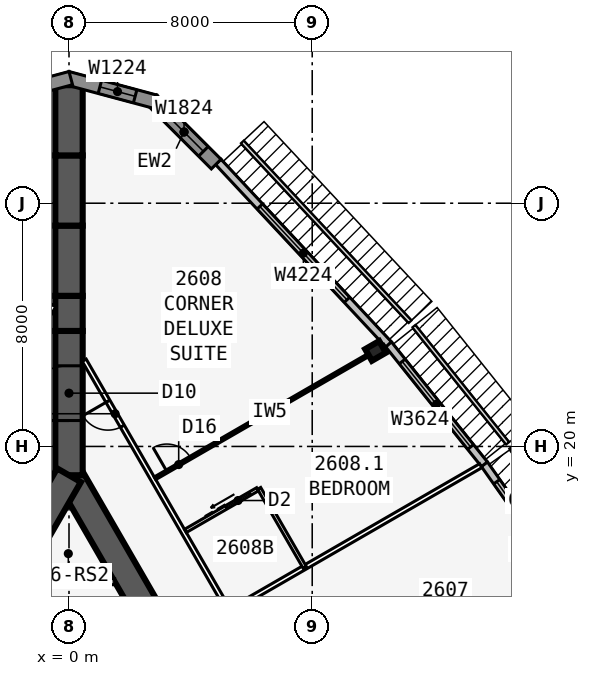
"""IFC4 building model, lengths in metres.
Left out: names, types, materials, properties, quantities, classifications, styles, units other than length and angle.
Written with IfcOpenShell. Run it as: python <this file> out.ifc"""

import sys

from ifc_helpers import new_model, si_unit, direction, frame, frame_2d, origin, origin_2d, place, context, subcontext, project, spatial, polyline, rectangle, i_section, outline, extrude, element, fill, save


model = new_model("IFC4")
c1 = context("Model", 3, precision=1e-05, world=origin(), true_north=direction((0.0, 1.0)))
c2 = subcontext(c1, "Body", "Model", "MODEL_VIEW")
j1 = project(units=[si_unit("LENGTHUNIT", "METRE"), si_unit("PLANEANGLEUNIT", "RADIAN")], contexts=[c1])
p1 = place(None, origin())
s1 = spatial("IfcSite", under=j1, at=p1, CompositionType="ELEMENT")
p2 = place(p1, origin())
s2 = spatial("IfcBuilding", under=s1, at=p2, CompositionType="ELEMENT")
p3 = place(p2, frame((0.0, 0.0, 99.9)))
s3 = spatial("IfcBuildingStorey", under=s2, at=p3, CompositionType="ELEMENT", Elevation=99.9)
p4 = place(p3, frame((16.5, -9.526, 0.0), z_axis=(0.0, 0.0, 1.0), x_axis=(-0.499999749417, 0.866025548458, 0.0)))
e1 = element("IfcWall", 1, at=p4, inside=s3, PredefinedType="SHEAR", context=c2, shape_type="SweptSolid", body=[
    extrude(rectangle(XDim=33.0, YDim=0.9, at=frame_2d((16.5, 0.0))), origin(), (0.0, 0.0, 1.0), 3.4),
])
p5 = place(p4, frame((14.15, 0.0, 0.0)))
e2 = element("IfcOpeningElement", 2, at=p5, cuts=e1, PredefinedType="OPENING", context=c2, shape_type="SweptSolid", body=[
    extrude(rectangle(XDim=1.8, YDim=2.13, at=frame_2d((0.9, 1.065))), frame((0.0, 0.46, 0.0), z_axis=(0.0, -1.0, 0.0), x_axis=(1.0, 0.0, 0.0)), (0.0, 0.0, 1.0), 0.92),
])
p6 = place(p4, frame((12.6, 0.0, 0.0)))
e3 = element("IfcOpeningElement", 3, at=p6, cuts=e1, PredefinedType="OPENING", context=c2, shape_type="SweptSolid", body=[
    extrude(rectangle(XDim=1.0, YDim=2.13, at=frame_2d((0.5, 1.065))), frame((0.0, 0.46, 0.0), z_axis=(0.0, -1.0, 0.0), x_axis=(1.0, 0.0, 0.0)), (0.0, 0.0, 1.0), 0.92),
])
p7 = place(p3, frame((0.0, 19.052, 0.0), z_axis=(0.0, 0.0, 1.0), x_axis=(-0.499999749417, -0.866025548458, 0.0)))
e4 = element("IfcWall", 4, at=p7, inside=s3, PredefinedType="SHEAR", context=c2, shape_type="SweptSolid", body=[
    extrude(rectangle(XDim=33.0, YDim=0.9, at=frame_2d((16.5, 0.0))), origin(), (0.0, 0.0, 1.0), 3.4),
])
p8 = place(p7, frame((14.15, 0.0, 0.0)))
e5 = element("IfcOpeningElement", 5, at=p8, cuts=e4, PredefinedType="OPENING", context=c2, shape_type="SweptSolid", body=[
    extrude(rectangle(XDim=1.8, YDim=2.13, at=frame_2d((0.9, 1.065))), frame((0.0, 0.46, 0.0), z_axis=(0.0, -1.0, 0.0), x_axis=(1.0, 0.0, 0.0)), (0.0, 0.0, 1.0), 0.92),
])
p9 = place(p7, frame((12.6, 0.0, 0.0)))
e6 = element("IfcOpeningElement", 6, at=p9, cuts=e4, PredefinedType="OPENING", context=c2, shape_type="SweptSolid", body=[
    extrude(rectangle(XDim=1.0, YDim=2.13, at=frame_2d((0.5, 1.065))), frame((0.0, 0.46, 0.0), z_axis=(0.0, -1.0, 0.0), x_axis=(1.0, 0.0, 0.0)), (0.0, 0.0, 1.0), 0.92),
])
p10 = place(p3, frame((0.0, 19.052, 0.0), z_axis=(0.0, 0.0, 1.0), x_axis=(0.0, 1.0, 0.0)))
e7 = element("IfcWall", 7, at=p10, inside=s3, PredefinedType="SHEAR", context=c2, shape_type="SweptSolid", body=[
    extrude(rectangle(XDim=4.746, YDim=0.9, at=frame_2d((2.373, 0.0))), origin(), (0.0, 0.0, 1.0), 3.4),
])
p11 = place(p10, frame((1.8, 0.0, 0.0)))
e8 = element("IfcOpeningElement", 8, at=p11, cuts=e7, PredefinedType="OPENING", context=c2, shape_type="SweptSolid", body=[
    extrude(rectangle(XDim=1.8, YDim=2.13, at=frame_2d((0.9, 1.065))), frame((0.0, 0.46, 0.0), z_axis=(0.0, -1.0, 0.0), x_axis=(1.0, 0.0, 0.0)), (0.0, 0.0, 1.0), 0.92),
])
p12 = place(p3, frame((0.0, 23.799, 0.0), z_axis=(0.0, 0.0, 1.0), x_axis=(0.0, 1.0, 0.0)))
e9 = element("IfcWall", 9, at=p12, inside=s3, PredefinedType="SHEAR", context=c2, shape_type="SweptSolid", body=[
    extrude(rectangle(XDim=1.155, YDim=0.9, at=frame_2d((0.577, 0.0))), origin(), (0.0, 0.0, 1.0), 3.4),
])
p13 = place(p3, frame((0.0, 24.953, 0.0), z_axis=(0.0, 0.0, 1.0), x_axis=(0.0, 1.0, 0.0)))
e10 = element("IfcWall", 10, at=p13, inside=s3, PredefinedType="SHEAR", context=c2, shape_type="SweptSolid", body=[
    extrude(rectangle(XDim=2.309, YDim=0.9, at=frame_2d((1.155, 0.0))), origin(), (0.0, 0.0, 1.0), 3.4),
])
p14 = place(p3, frame((0.0, 27.263, 0.0), z_axis=(0.0, 0.0, 1.0), x_axis=(0.0, 1.0, 0.0)))
e11 = element("IfcWall", 11, at=p14, inside=s3, PredefinedType="SHEAR", context=c2, shape_type="SweptSolid", body=[
    extrude(rectangle(XDim=2.31, YDim=0.9, at=frame_2d((1.155, 0.0))), origin(), (0.0, 0.0, 1.0), 3.4),
])
p15 = place(p3, frame((0.0, 29.572, 0.0), z_axis=(0.0, 0.0, 1.0), x_axis=(0.0, 1.0, 0.0)))
e12 = element("IfcWall", 12, at=p15, inside=s3, PredefinedType="SHEAR", context=c2, shape_type="SweptSolid", body=[
    extrude(rectangle(XDim=2.309, YDim=0.9, at=frame_2d((1.155, 0.0))), origin(), (0.0, 0.0, 1.0), 3.4),
])
p16 = place(p3, frame((10.083, 23.142, 0.0), z_axis=(0.0, 0.0, 1.0), x_axis=(-0.5, 0.866025403784, 0.0)))
e13 = element("IfcColumn", 13, at=p16, inside=s3, PredefinedType="COLUMN", context=c2, shape_type="SweptSolid", body=[
    extrude(i_section(OverallWidth=0.442, OverallDepth=0.531, WebThickness=0.066, FlangeThickness=0.106, at=origin_2d()), origin(), (0.0, 0.0, 1.0), 3.4),
])
p17 = place(p3, frame((16.555, 15.318, 0.0), z_axis=(0.0, 0.0, 1.0), x_axis=(-0.5766431066, 0.81699616132, 0.0)))
e14 = element("IfcWall", 14, at=p17, inside=s3, PredefinedType="STANDARD", context=c2, shape_type="SweptSolid", body=[
    extrude(rectangle(XDim=5.021, YDim=0.25, at=frame_2d((2.51, 0.0))), origin(), (0.0, 0.0, 1.0), 3.15),
])
p18 = place(p17, frame((0.71, 0.0, 0.45)))
e15 = element("IfcOpeningElement", 15, at=p18, cuts=e14, PredefinedType="OPENING", context=c2, shape_type="SweptSolid", body=[
    extrude(rectangle(XDim=3.6, YDim=2.4, at=frame_2d((1.8, 1.2))), frame((0.0, 0.135, 0.0), z_axis=(0.0, -1.0, 0.0), x_axis=(1.0, 0.0, 0.0)), (0.0, 0.0, 1.0), 0.27),
])
p19 = place(p3, frame((13.664, 19.414, 0.0), z_axis=(0.0, 0.0, 1.0), x_axis=(-0.624594965756, 0.780948864364, 0.0)))
e16 = element("IfcWall", 16, at=p19, inside=s3, PredefinedType="STANDARD", context=c2, shape_type="SweptSolid", body=[
    extrude(rectangle(XDim=5.058, YDim=0.25, at=frame_2d((2.529, 0.0))), origin(), (0.0, 0.0, 1.0), 3.15),
])
p20 = place(p19, frame((0.729, 0.0, 0.45)))
e17 = element("IfcOpeningElement", 17, at=p20, cuts=e16, PredefinedType="OPENING", context=c2, shape_type="SweptSolid", body=[
    extrude(rectangle(XDim=3.6, YDim=2.4, at=frame_2d((1.8, 1.2))), frame((0.0, 0.135, 0.0), z_axis=(0.0, -1.0, 0.0), x_axis=(1.0, 0.0, 0.0)), (0.0, 0.0, 1.0), 0.27),
])
p21 = place(p3, frame((10.511, 23.357, 0.0), z_axis=(0.0, 0.0, 1.0), x_axis=(-0.682289646561, 0.731081964075, 0.0)))
e18 = element("IfcWall", 18, at=p21, inside=s3, PredefinedType="STANDARD", context=c2, shape_type="SweptSolid", body=[
    extrude(rectangle(XDim=8.211, YDim=0.25, at=frame_2d((4.105, 0.0))), origin(), (0.0, 0.0, 1.0), 3.15),
])
p22 = place(p21, frame((2.006, 0.0, 0.45)))
e19 = element("IfcOpeningElement", 19, at=p22, cuts=e18, PredefinedType="OPENING", context=c2, shape_type="SweptSolid", body=[
    extrude(rectangle(XDim=4.2, YDim=2.4, at=frame_2d((2.1, 1.2))), frame((0.0, 0.135, 0.0), z_axis=(0.0, -1.0, 0.0), x_axis=(1.0, 0.0, 0.0)), (0.0, 0.0, 1.0), 0.27),
])
p23 = place(p3, frame((4.841, 29.286, 0.0), z_axis=(0.0, 0.0, 1.0), x_axis=(-0.707106781187, 0.707106781187, 0.0)))
e20 = element("IfcWall", 20, at=p23, inside=s3, PredefinedType="SOLIDWALL", context=c2, shape_type="SweptSolid", body=[
    extrude(rectangle(XDim=2.988, YDim=0.45, at=frame_2d((1.494, 0.0))), origin(), (0.0, 0.0, 1.0), 3.15),
])
p24 = place(p23, frame((0.594, 0.0, 0.45)))
e21 = element("IfcOpeningElement", 21, at=p24, cuts=e20, PredefinedType="OPENING", context=c2, shape_type="SweptSolid", body=[
    extrude(rectangle(XDim=1.8, YDim=2.4, at=frame_2d((0.9, 1.2))), frame((0.0, 0.235, 0.0), z_axis=(0.0, -1.0, 0.0), x_axis=(1.0, 0.0, 0.0)), (0.0, 0.0, 1.0), 0.47),
])
p25 = place(p3, frame((2.829, 31.341, 0.0), z_axis=(0.0, 0.0, 1.0), x_axis=(-0.965930548995, 0.258801419081, 0.0)))
e22 = element("IfcWall", 22, at=p25, inside=s3, PredefinedType="SOLIDWALL", context=c2, shape_type="SweptSolid", body=[
    extrude(outline(polyline([(2.989, 0.225), (2.929, 0.225), (2.438, 0.093), (2.402, 0.225), (0.0, 0.225), (0.0, -0.225), (2.989, -0.225), (2.989, 0.225)])), origin(), (0.0, 0.0, 1.0), 3.15),
])
p26 = place(p25, frame((0.676, 0.0, 0.45)))
e23 = element("IfcOpeningElement", 23, at=p26, cuts=e22, PredefinedType="OPENING", context=c2, shape_type="SweptSolid", body=[
    extrude(rectangle(XDim=1.2, YDim=2.4, at=frame_2d((0.6, 1.2))), frame((0.0, 0.235, 0.0), z_axis=(0.0, -1.0, 0.0), x_axis=(1.0, 0.0, 0.0)), (0.0, 0.0, 1.0), 0.47),
])
p27 = place(p3, frame((0.058, 32.114, 0.0), z_axis=(0.0, 0.0, 1.0), x_axis=(-0.965930548995, -0.258801419081, 0.0)))
e24 = element("IfcWall", 24, at=p27, inside=s3, PredefinedType="SOLIDWALL", context=c2, shape_type="SweptSolid", body=[
    extrude(outline(polyline([(2.989, 0.225), (0.586, 0.225), (0.551, 0.093), (0.059, 0.225), (0.0, 0.225), (0.0, -0.225), (2.989, -0.225), (2.989, 0.225)])), origin(), (0.0, 0.0, 1.0), 3.15),
])
p28 = place(p27, frame((1.113, 0.0, 0.45)))
e25 = element("IfcOpeningElement", 25, at=p28, cuts=e24, PredefinedType="OPENING", context=c2, shape_type="SweptSolid", body=[
    extrude(rectangle(XDim=1.2, YDim=2.4, at=frame_2d((0.6, 1.2))), frame((0.0, 0.235, 0.0), z_axis=(0.0, -1.0, 0.0), x_axis=(1.0, 0.0, 0.0)), (0.0, 0.0, 1.0), 0.47),
])
p29 = place(p3, frame((20.027, -10.985, 0.0), z_axis=(0.0, 0.0, 1.0), x_axis=(-0.500001677587, 0.866024435227, 0.0)))
e26 = element("IfcWall", 26, at=p29, inside=s3, PredefinedType="PARTITIONING", context=c2, shape_type="SweptSolid", body=[
    extrude(rectangle(XDim=39.054, YDim=0.15, at=frame_2d((19.527, 0.0))), origin(), (0.0, 0.0, 1.0), 3.15),
])
p30 = place(p29, frame((1.558, 0.0, 0.0)))
e27 = element("IfcOpeningElement", 27, at=p30, cuts=e26, PredefinedType="OPENING", context=c2, shape_type="SweptSolid", body=[
    extrude(rectangle(XDim=0.95, YDim=2.13, at=frame_2d((0.475, 1.065))), frame((0.0, 0.085, 0.0), z_axis=(0.0, -1.0, 0.0), x_axis=(1.0, 0.0, 0.0)), (0.0, 0.0, 1.0), 0.17),
])
p31 = place(p29, frame((11.552, 0.0, 0.0)))
e28 = element("IfcOpeningElement", 28, at=p31, cuts=e26, PredefinedType="OPENING", context=c2, shape_type="SweptSolid", body=[
    extrude(rectangle(XDim=0.95, YDim=2.13, at=frame_2d((0.475, 1.065))), frame((0.0, 0.085, 0.0), z_axis=(0.0, -1.0, 0.0), x_axis=(1.0, 0.0, 0.0)), (0.0, 0.0, 1.0), 0.17),
])
p32 = place(p29, frame((22.752, 0.0, 0.0)))
e29 = element("IfcOpeningElement", 29, at=p32, cuts=e26, PredefinedType="OPENING", context=c2, shape_type="SweptSolid", body=[
    extrude(rectangle(XDim=0.95, YDim=2.13, at=frame_2d((0.475, 1.065))), frame((0.0, 0.085, 0.0), z_axis=(0.0, -1.0, 0.0), x_axis=(1.0, 0.0, 0.0)), (0.0, 0.0, 1.0), 0.17),
])
p33 = place(p29, frame((36.546, 0.0, 0.0)))
e30 = element("IfcOpeningElement", 30, at=p33, cuts=e26, PredefinedType="OPENING", context=c2, shape_type="SweptSolid", body=[
    extrude(rectangle(XDim=0.95, YDim=2.13, at=frame_2d((0.475, 1.065))), frame((0.0, 0.085, 0.0), z_axis=(0.0, -1.0, 0.0), x_axis=(1.0, 0.0, 0.0)), (0.0, 0.0, 1.0), 0.17),
])
p34 = place(p3, frame((5.329, 14.623, 0.0), z_axis=(0.0, 0.0, 1.0), x_axis=(0.866018409083, 0.500012114982, 0.0)))
e31 = element("IfcWall", 31, at=p34, inside=s3, PredefinedType="PARTITIONING", context=c2, shape_type="SweptSolid", body=[
    extrude(rectangle(XDim=9.485, YDim=0.15, at=frame_2d((4.742, 0.0))), origin(), (0.0, 0.0, 1.0), 2.109),
])
p35 = place(p3, frame((2.829, 18.954, 0.0), z_axis=(0.0, 0.0, 1.0), x_axis=(0.866020536561, 0.500008430184, 0.0)))
e32 = element("IfcWall", 32, at=p35, inside=s3, PredefinedType="PARTITIONING", context=c2, shape_type="SweptSolid", body=[
    extrude(rectangle(XDim=8.72, YDim=0.1, at=frame_2d((4.36, 0.0))), origin(), (0.0, 0.0, 1.0), 2.05),
])
p36 = place(p35, frame((0.45, 0.0, 0.0)))
e33 = element("IfcOpeningElement", 33, at=p36, cuts=e32, PredefinedType="OPENING", context=c2, shape_type="SweptSolid", body=[
    extrude(rectangle(XDim=0.9, YDim=2.032, at=frame_2d((0.45, 1.016))), frame((0.0, 0.06, 0.0), z_axis=(0.0, -1.0, 0.0), x_axis=(1.0, 0.0, 0.0)), (0.0, 0.0, 1.0), 0.12),
])
p37 = place(p3, frame((7.753, 16.023, 0.0), z_axis=(0.0, 0.0, 1.0), x_axis=(-0.499990139034, 0.866031096941, 0.0)))
e34 = element("IfcWall", 34, at=p37, inside=s3, PredefinedType="PLUMBINGWALL", context=c2, shape_type="SweptSolid", body=[
    extrude(rectangle(XDim=3.0, YDim=0.12, at=frame_2d((1.5, 0.0))), origin(), (0.0, 0.0, 1.0), 3.15),
])
p38 = place(p3, frame((3.829, 17.221, 0.0), z_axis=(0.0, 0.0, 1.0), x_axis=(0.865997131366, 0.500048966069, 0.0)))
e35 = element("IfcWall", 35, at=p38, inside=s3, PredefinedType="PLUMBINGWALL", context=c2, shape_type="SweptSolid", body=[
    extrude(rectangle(XDim=2.74, YDim=0.12, at=frame_2d((1.37, 0.0))), origin(), (0.0, 0.0, 1.0), 3.15),
])
p39 = place(p38, frame((1.55, 0.0, 0.0)))
e36 = element("IfcOpeningElement", 36, at=p39, cuts=e35, PredefinedType="OPENING", context=c2, shape_type="SweptSolid", body=[
    extrude(rectangle(XDim=0.9, YDim=2.13, at=frame_2d((0.45, 1.065))), frame((0.0, 0.07, 0.0), z_axis=(0.0, -1.0, 0.0), x_axis=(1.0, 0.0, 0.0)), (0.0, 0.0, 1.0), 0.14),
])
p40 = place(p3, frame((-0.5, 24.636, 0.0), z_axis=(0.0, 0.0, 1.0), x_axis=(-0.500001915564, -0.86602429783, 0.0)))
e37 = element("IfcWall", 37, at=p40, inside=s3, PredefinedType="PARTITIONING", context=c2, shape_type="SweptSolid", body=[
    extrude(rectangle(XDim=42.172, YDim=0.15, at=frame_2d((21.086, 0.0))), origin(), (0.0, 0.0, 1.0), 3.15),
])
p41 = place(p40, frame((1.911, 0.0, 0.0)))
e38 = element("IfcOpeningElement", 38, at=p41, cuts=e37, PredefinedType="OPENING", context=c2, shape_type="SweptSolid", body=[
    extrude(rectangle(XDim=0.95, YDim=2.13, at=frame_2d((0.475, 1.065))), frame((0.0, 0.085, 0.0), z_axis=(0.0, -1.0, 0.0), x_axis=(1.0, 0.0, 0.0)), (0.0, 0.0, 1.0), 0.17),
])
p42 = place(p40, frame((8.111, 0.0, 0.0)))
e39 = element("IfcOpeningElement", 39, at=p42, cuts=e37, PredefinedType="OPENING", context=c2, shape_type="SweptSolid", body=[
    extrude(rectangle(XDim=0.95, YDim=2.13, at=frame_2d((0.475, 1.065))), frame((0.0, 0.085, 0.0), z_axis=(0.0, -1.0, 0.0), x_axis=(1.0, 0.0, 0.0)), (0.0, 0.0, 1.0), 0.17),
])
p43 = place(p40, frame((18.111, 0.0, 0.0)))
e40 = element("IfcOpeningElement", 40, at=p43, cuts=e37, PredefinedType="OPENING", context=c2, shape_type="SweptSolid", body=[
    extrude(rectangle(XDim=0.95, YDim=2.13, at=frame_2d((0.475, 1.065))), frame((0.0, 0.085, 0.0), z_axis=(0.0, -1.0, 0.0), x_axis=(1.0, 0.0, 0.0)), (0.0, 0.0, 1.0), 0.17),
])
p44 = place(p40, frame((28.711, 0.0, 0.0)))
e41 = element("IfcOpeningElement", 41, at=p44, cuts=e37, PredefinedType="OPENING", context=c2, shape_type="SweptSolid", body=[
    extrude(rectangle(XDim=0.95, YDim=2.13, at=frame_2d((0.475, 1.065))), frame((0.0, 0.085, 0.0), z_axis=(0.0, -1.0, 0.0), x_axis=(1.0, 0.0, 0.0)), (0.0, 0.0, 1.0), 0.17),
])
p45 = place(p40, frame((33.711, 0.0, 0.0)))
e42 = element("IfcOpeningElement", 42, at=p45, cuts=e37, PredefinedType="OPENING", context=c2, shape_type="SweptSolid", body=[
    extrude(rectangle(XDim=0.95, YDim=2.13, at=frame_2d((0.475, 1.065))), frame((0.0, 0.085, 0.0), z_axis=(0.0, -1.0, 0.0), x_axis=(1.0, 0.0, 0.0)), (0.0, 0.0, 1.0), 0.17),
])
p46 = place(p40, frame((39.311, 0.0, 0.0)))
e43 = element("IfcOpeningElement", 43, at=p46, cuts=e37, PredefinedType="OPENING", context=c2, shape_type="SweptSolid", body=[
    extrude(rectangle(XDim=0.95, YDim=2.13, at=frame_2d((0.475, 1.065))), frame((0.0, 0.085, 0.0), z_axis=(0.0, -1.0, 0.0), x_axis=(1.0, 0.0, 0.0)), (0.0, 0.0, 1.0), 0.17),
])
p47 = place(p3, frame((-1.501, 15.552, 0.0), z_axis=(0.0, 0.0, 1.0), x_axis=(1.0, 0.0, 0.0)))
e44 = element("IfcWall", 44, at=p47, inside=s3, PredefinedType="SOLIDWALL", context=c2, shape_type="SweptSolid", body=[
    extrude(rectangle(XDim=3.002, YDim=0.2, at=frame_2d((1.501, 0.0))), origin(), (0.0, 0.0, 1.0), 3.15),
])
p48 = place(p18, origin())
e45 = element("IfcWindow", 45, at=p48, inside=s3, PartitioningType="SINGLE_PANEL", PredefinedType="WINDOW", context=c2, shape_type="SweptSolid", body=[
    extrude(rectangle(XDim=3.6, YDim=2.4, at=frame_2d((1.8, 1.2))), frame((0.0, 0.03, 0.0), z_axis=(0.0, -1.0, 0.0), x_axis=(1.0, 0.0, 0.0)), (0.0, 0.0, 1.0), 0.06),
])
fill(e15, e45)
p49 = place(p20, origin())
e46 = element("IfcWindow", 46, at=p49, inside=s3, PartitioningType="SINGLE_PANEL", PredefinedType="WINDOW", context=c2, shape_type="SweptSolid", body=[
    extrude(rectangle(XDim=3.6, YDim=2.4, at=frame_2d((1.8, 1.2))), frame((0.0, 0.03, 0.0), z_axis=(0.0, -1.0, 0.0), x_axis=(1.0, 0.0, 0.0)), (0.0, 0.0, 1.0), 0.06),
])
fill(e17, e46)
p50 = place(p22, origin())
e47 = element("IfcWindow", 47, at=p50, inside=s3, PartitioningType="SINGLE_PANEL", PredefinedType="WINDOW", context=c2, shape_type="SweptSolid", body=[
    extrude(rectangle(XDim=4.2, YDim=2.4, at=frame_2d((2.1, 1.2))), frame((0.0, 0.03, 0.0), z_axis=(0.0, -1.0, 0.0), x_axis=(1.0, 0.0, 0.0)), (0.0, 0.0, 1.0), 0.06),
])
fill(e19, e47)
p51 = place(p24, origin())
e48 = element("IfcWindow", 48, at=p51, inside=s3, PartitioningType="SINGLE_PANEL", PredefinedType="WINDOW", context=c2, shape_type="SweptSolid", body=[
    extrude(rectangle(XDim=1.8, YDim=2.4, at=frame_2d((0.9, 1.2))), frame((0.0, 0.03, 0.0), z_axis=(0.0, -1.0, 0.0), x_axis=(1.0, 0.0, 0.0)), (0.0, 0.0, 1.0), 0.06),
])
fill(e21, e48)
p52 = place(p26, origin())
e49 = element("IfcWindow", 49, at=p52, inside=s3, PartitioningType="SINGLE_PANEL", PredefinedType="WINDOW", context=c2, shape_type="SweptSolid", body=[
    extrude(rectangle(XDim=1.2, YDim=2.4, at=frame_2d((0.6, 1.2))), frame((0.0, 0.03, 0.0), z_axis=(0.0, -1.0, 0.0), x_axis=(1.0, 0.0, 0.0)), (0.0, 0.0, 1.0), 0.06),
])
fill(e23, e49)
p53 = place(p36, origin())
e50 = element("IfcDoor", 50, at=p53, inside=s3, OperationType="SINGLE_SWING_LEFT", PredefinedType="DOOR", context=c2, shape_type="SweptSolid", body=[
    extrude(rectangle(XDim=0.9, YDim=2.032, at=frame_2d((0.45, 1.016))), frame((0.0, 0.025, 0.0), z_axis=(0.0, -1.0, 0.0), x_axis=(1.0, 0.0, 0.0)), (0.0, 0.0, 1.0), 0.05),
])
fill(e33, e50)
p54 = place(p39, origin())
e51 = element("IfcDoor", 51, at=p54, inside=s3, OperationType="SLIDING_TO_LEFT", PredefinedType="DOOR", context=c2, shape_type="SweptSolid", body=[
    extrude(rectangle(XDim=0.9, YDim=2.13, at=frame_2d((0.45, 1.065))), frame((0.0, 0.025, 0.0), z_axis=(0.0, -1.0, 0.0), x_axis=(1.0, 0.0, 0.0)), (0.0, 0.0, 1.0), 0.05),
])
fill(e36, e51)
p55 = place(p33, origin())
e52 = element("IfcDoor", 52, at=p55, inside=s3, OperationType="SINGLE_SWING_RIGHT", PredefinedType="DOOR", context=c2, shape_type="SweptSolid", body=[
    extrude(rectangle(XDim=0.95, YDim=2.13, at=frame_2d((0.475, 1.065))), frame((0.0, 0.025, 0.0), z_axis=(0.0, -1.0, 0.0), x_axis=(1.0, 0.0, 0.0)), (0.0, 0.0, 1.0), 0.05),
])
fill(e30, e52)
p56 = place(p11, origin())
e53 = element("IfcDoor", 53, at=p56, inside=s3, OperationType="DOUBLE_DOOR_DOUBLE_SWING", PredefinedType="DOOR", context=c2, shape_type="SweptSolid", body=[
    extrude(rectangle(XDim=1.8, YDim=2.13, at=frame_2d((0.9, 1.065))), frame((0.0, 0.025, 0.0), z_axis=(0.0, -1.0, 0.0), x_axis=(1.0, 0.0, 0.0)), (0.0, 0.0, 1.0), 0.05),
])
fill(e8, e53)
save(model, sys.argv[1])
